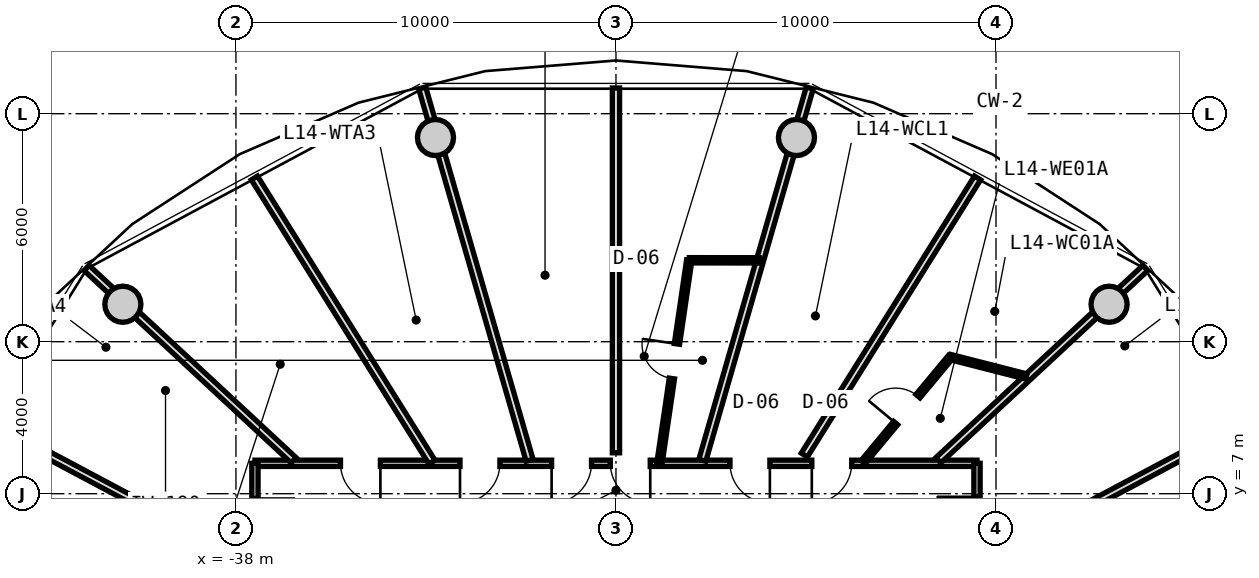
"""IFC4 building model, lengths in metres.
Left out: names, types, materials, properties, quantities, classifications, styles, units other than length and angle.
Written with IfcOpenShell. Run it as: python <this file> out.ifc"""

import sys

from ifc_helpers import new_model, si_unit, direction, frame, frame_2d, origin, origin_2d, place, context, subcontext, project, spatial, rectangle, circle, extrude, source, transform, mapped, element, fill, save


model = new_model("IFC4")
c1 = context("Model", 3, precision=1e-05, world=origin(), true_north=direction((0.0, 1.0)))
c2 = subcontext(c1, "Body", "Model", "MODEL_VIEW")
j1 = project(units=[si_unit("LENGTHUNIT", "METRE"), si_unit("PLANEANGLEUNIT", "RADIAN")], contexts=[c1])
p1 = place(None, origin())
s1 = spatial("IfcSite", under=j1, at=p1, CompositionType="ELEMENT")
p2 = place(p1, origin())
s2 = spatial("IfcBuilding", under=s1, at=p2, CompositionType="ELEMENT")
p3 = place(p2, frame((0.0, 0.0, 49.05)))
s3 = spatial("IfcBuildingStorey", under=s2, at=p3, CompositionType="ELEMENT", Elevation=49.05)
m1 = source(origin(), c2, "Body", "SweptSolid", [
    extrude(circle(Radius=0.475, at=origin_2d()), origin(), (0.0, 0.0, 1.0), 3.05),
])
for number, where, z_axis, x_axis in (
    (1, (-15.025, 11.985, 0.0), (0.0, 0.0, 1.0), (1.0, 0.0, 0.0)),
    (2, (-23.251, 16.373, 0.0), (0.0, 0.0, 1.0), (1.0, 0.0, 0.0)),
    (3, (-32.749, 16.373, 0.0), (0.0, 0.0, 1.0), (1.0, 0.0, 0.0)),
    (4, (-40.975, 11.985, 0.0), (0.0, 0.0, 1.0), (1.0, 0.0, 0.0)),
):
    element("IfcColumn", number, at=place(p3, frame(where, z_axis=z_axis, x_axis=x_axis)), inside=s3, PredefinedType="COLUMN", context=c2, shape_type="MappedRepresentation", body=[
        mapped(m1, transform((0.0, 0.0, 0.0), x_axis=(1.0, 0.0, 0.0), y_axis=(0.0, 1.0, 0.0), z_axis=(0.0, 0.0, 1.0), scale=1.0)),
    ])
m2 = source(origin(), c2, "Body", "SweptSolid", [
    extrude(rectangle(XDim=19.0, YDim=0.165, at=frame_2d((9.5, 0.0))), origin(), (0.0, 0.0, 1.0), 2.775),
])
p4 = place(p3, frame((-37.5, 7.8, 0.0), z_axis=(0.0, 0.0, 1.0), x_axis=(1.0, 0.0, 0.0)))
e5 = element("IfcWall", 5, at=p4, inside=s3, PredefinedType="PARTITIONING", context=c2, shape_type="MappedRepresentation", body=[
    mapped(m2, transform((0.0, 0.0, 0.0), x_axis=(1.0, 0.0, 0.0), y_axis=(0.0, 1.0, 0.0), z_axis=(0.0, 0.0, 1.0), scale=1.0)),
])
p5 = place(p4, frame((14.653, 0.0, 0.0)))
e6 = element("IfcOpeningElement", 6, at=p5, cuts=e5, PredefinedType="OPENING", context=c2, shape_type="SweptSolid", body=[
    extrude(rectangle(XDim=1.05, YDim=2.15, at=frame_2d((0.525, 1.075))), frame((0.0, 0.093, 0.0), z_axis=(0.0, -1.0, 0.0), x_axis=(1.0, 0.0, 0.0)), (0.0, 0.0, 1.0), 0.185),
])
p6 = place(p4, frame((12.5, 0.0, 0.0)))
e7 = element("IfcOpeningElement", 7, at=p6, cuts=e5, PredefinedType="OPENING", context=c2, shape_type="SweptSolid", body=[
    extrude(rectangle(XDim=1.05, YDim=2.15, at=frame_2d((0.525, 1.075))), frame((0.0, 0.093, 0.0), z_axis=(0.0, -1.0, 0.0), x_axis=(1.0, 0.0, 0.0)), (0.0, 0.0, 1.0), 0.185),
])
p7 = place(p4, frame((9.352, 0.0, 0.0)))
e8 = element("IfcOpeningElement", 8, at=p7, cuts=e5, PredefinedType="OPENING", context=c2, shape_type="SweptSolid", body=[
    extrude(rectangle(XDim=1.05, YDim=2.15, at=frame_2d((0.525, 1.075))), frame((0.0, 0.093, 0.0), z_axis=(0.0, -1.0, 0.0), x_axis=(1.0, 0.0, 0.0)), (0.0, 0.0, 1.0), 0.185),
])
p8 = place(p4, frame((7.806, 0.0, 0.0)))
e9 = element("IfcOpeningElement", 9, at=p8, cuts=e5, PredefinedType="OPENING", context=c2, shape_type="SweptSolid", body=[
    extrude(rectangle(XDim=1.05, YDim=2.15, at=frame_2d((0.525, 1.075))), frame((0.0, 0.093, 0.0), z_axis=(0.0, -1.0, 0.0), x_axis=(1.0, 0.0, 0.0)), (0.0, 0.0, 1.0), 0.185),
])
p9 = place(p4, frame((5.396, 0.0, 0.0)))
e10 = element("IfcOpeningElement", 10, at=p9, cuts=e5, PredefinedType="OPENING", context=c2, shape_type="SweptSolid", body=[
    extrude(rectangle(XDim=1.05, YDim=2.15, at=frame_2d((0.525, 1.075))), frame((0.0, 0.093, 0.0), z_axis=(0.0, -1.0, 0.0), x_axis=(1.0, 0.0, 0.0)), (0.0, 0.0, 1.0), 0.185),
])
p10 = place(p4, frame((2.251, 0.0, 0.0)))
e11 = element("IfcOpeningElement", 11, at=p10, cuts=e5, PredefinedType="OPENING", context=c2, shape_type="SweptSolid", body=[
    extrude(rectangle(XDim=1.05, YDim=2.15, at=frame_2d((0.525, 1.075))), frame((0.0, 0.093, 0.0), z_axis=(0.0, -1.0, 0.0), x_axis=(1.0, 0.0, 0.0)), (0.0, 0.0, 1.0), 0.185),
])
m3 = source(origin(), c2, "Body", "SweptSolid", [
    extrude(rectangle(XDim=15.6, YDim=0.165, at=frame_2d((7.8, 0.0))), origin(), (0.0, 0.0, 1.0), 2.775),
])
p11 = place(p3, frame((-37.5, -7.8, 0.0), z_axis=(0.0, 0.0, 1.0), x_axis=(0.0, 1.0, 0.0)))
e12 = element("IfcWall", 12, at=p11, inside=s3, PredefinedType="PARTITIONING", context=c2, shape_type="MappedRepresentation", body=[
    mapped(m3, transform((0.0, 0.0, 0.0), x_axis=(1.0, 0.0, 0.0), y_axis=(0.0, 1.0, 0.0), z_axis=(0.0, 0.0, 1.0), scale=1.0)),
])
p12 = place(p11, frame((13.623, 0.0, 0.0)))
e13 = element("IfcOpeningElement", 13, at=p12, cuts=e12, PredefinedType="OPENING", context=c2, shape_type="SweptSolid", body=[
    extrude(rectangle(XDim=1.05, YDim=2.15, at=frame_2d((0.525, 1.075))), frame((0.0, 0.093, 0.0), z_axis=(0.0, -1.0, 0.0), x_axis=(1.0, 0.0, 0.0)), (0.0, 0.0, 1.0), 0.185),
])
p13 = place(p11, frame((11.018, 0.0, 0.0)))
e14 = element("IfcOpeningElement", 14, at=p13, cuts=e12, PredefinedType="OPENING", context=c2, shape_type="SweptSolid", body=[
    extrude(rectangle(XDim=1.05, YDim=2.15, at=frame_2d((0.525, 1.075))), frame((0.0, 0.093, 0.0), z_axis=(0.0, -1.0, 0.0), x_axis=(1.0, 0.0, 0.0)), (0.0, 0.0, 1.0), 0.185),
])
p14 = place(p11, frame((8.467, 0.0, 0.0)))
e15 = element("IfcOpeningElement", 15, at=p14, cuts=e12, PredefinedType="OPENING", context=c2, shape_type="SweptSolid", body=[
    extrude(rectangle(XDim=1.05, YDim=2.15, at=frame_2d((0.525, 1.075))), frame((0.0, 0.093, 0.0), z_axis=(0.0, -1.0, 0.0), x_axis=(1.0, 0.0, 0.0)), (0.0, 0.0, 1.0), 0.185),
])
p15 = place(p11, frame((6.035, 0.0, 0.0)))
e16 = element("IfcOpeningElement", 16, at=p15, cuts=e12, PredefinedType="OPENING", context=c2, shape_type="SweptSolid", body=[
    extrude(rectangle(XDim=1.05, YDim=2.15, at=frame_2d((0.525, 1.075))), frame((0.0, 0.093, 0.0), z_axis=(0.0, -1.0, 0.0), x_axis=(1.0, 0.0, 0.0)), (0.0, 0.0, 1.0), 0.185),
])
p16 = place(p11, frame((3.489, 0.0, 0.0)))
e17 = element("IfcOpeningElement", 17, at=p16, cuts=e12, PredefinedType="OPENING", context=c2, shape_type="SweptSolid", body=[
    extrude(rectangle(XDim=1.05, YDim=2.15, at=frame_2d((0.525, 1.075))), frame((0.0, 0.093, 0.0), z_axis=(0.0, -1.0, 0.0), x_axis=(1.0, 0.0, 0.0)), (0.0, 0.0, 1.0), 0.185),
])
p17 = place(p11, frame((0.882, 0.0, 0.0)))
e18 = element("IfcOpeningElement", 18, at=p17, cuts=e12, PredefinedType="OPENING", context=c2, shape_type="SweptSolid", body=[
    extrude(rectangle(XDim=1.05, YDim=2.15, at=frame_2d((0.525, 1.075))), frame((0.0, 0.093, 0.0), z_axis=(0.0, -1.0, 0.0), x_axis=(1.0, 0.0, 0.0)), (0.0, 0.0, 1.0), 0.185),
])
p18 = place(p3, frame((-18.5, 7.8, 0.0), z_axis=(0.0, 0.0, 1.0), x_axis=(0.0, -1.0, 0.0)))
e19 = element("IfcWall", 19, at=p18, inside=s3, PredefinedType="PARTITIONING", context=c2, shape_type="MappedRepresentation", body=[
    mapped(m3, transform((0.0, 0.0, 0.0), x_axis=(1.0, 0.0, 0.0), y_axis=(0.0, 1.0, 0.0), z_axis=(0.0, 0.0, 1.0), scale=1.0)),
])
p19 = place(p18, frame((12.141, 0.0, 0.0)))
e20 = element("IfcOpeningElement", 20, at=p19, cuts=e19, PredefinedType="OPENING", context=c2, shape_type="SweptSolid", body=[
    extrude(rectangle(XDim=1.25, YDim=2.2, at=frame_2d((0.625, 1.1))), frame((0.0, 0.093, 0.0), z_axis=(0.0, -1.0, 0.0), x_axis=(1.0, 0.0, 0.0)), (0.0, 0.0, 1.0), 0.185),
])
p20 = place(p18, frame((7.175, 0.0, 0.0)))
e21 = element("IfcOpeningElement", 21, at=p20, cuts=e19, PredefinedType="OPENING", context=c2, shape_type="SweptSolid", body=[
    extrude(rectangle(XDim=1.25, YDim=2.2, at=frame_2d((0.625, 1.1))), frame((0.0, 0.093, 0.0), z_axis=(0.0, -1.0, 0.0), x_axis=(1.0, 0.0, 0.0)), (0.0, 0.0, 1.0), 0.185),
])
p21 = place(p18, frame((2.826, 0.0, 0.0)))
e22 = element("IfcOpeningElement", 22, at=p21, cuts=e19, PredefinedType="OPENING", context=c2, shape_type="SweptSolid", body=[
    extrude(rectangle(XDim=1.05, YDim=2.15, at=frame_2d((0.525, 1.075))), frame((0.0, 0.093, 0.0), z_axis=(0.0, -1.0, 0.0), x_axis=(1.0, 0.0, 0.0)), (0.0, 0.0, 1.0), 0.185),
])
p22 = place(p18, frame((0.881, 0.0, 0.0)))
e23 = element("IfcOpeningElement", 23, at=p22, cuts=e19, PredefinedType="OPENING", context=c2, shape_type="SweptSolid", body=[
    extrude(rectangle(XDim=1.05, YDim=2.15, at=frame_2d((0.525, 1.075))), frame((0.0, 0.093, 0.0), z_axis=(0.0, -1.0, 0.0), x_axis=(1.0, 0.0, 0.0)), (0.0, 0.0, 1.0), 0.185),
])
m4 = source(origin(), c2, "Body", "SweptSolid", [
    extrude(rectangle(XDim=7.435, YDim=0.19, at=frame_2d((3.717, 0.0))), origin(), (0.0, 0.0, 1.0), 2.225),
])
p23 = place(p3, frame((-36.483, 7.88, 0.0), z_axis=(0.0, 0.0, 1.0), x_axis=(-0.732651956848, 0.680603489652, 0.0)))
e24 = element("IfcWall", 24, at=p23, inside=s3, PredefinedType="PARTITIONING", context=c2, shape_type="MappedRepresentation", body=[
    mapped(m4, transform((0.0, 0.0, 0.0), x_axis=(1.0, 0.0, 0.0), y_axis=(0.0, 1.0, 0.0), z_axis=(0.0, 0.0, 1.0), scale=1.0)),
])
m5 = source(origin(), c2, "Body", "SweptSolid", [
    extrude(rectangle(XDim=7.873, YDim=0.19, at=frame_2d((3.937, 0.0))), origin(), (0.0, 0.0, 1.0), 2.775),
])
p24 = place(p3, frame((-37.53, 5.138, 0.0), z_axis=(0.0, 0.0, 1.0), x_axis=(-0.882666052726, 0.470000680175, 0.0)))
e25 = element("IfcWall", 25, at=p24, inside=s3, PredefinedType="PARTITIONING", context=c2, shape_type="MappedRepresentation", body=[
    mapped(m5, transform((0.0, 0.0, 0.0), x_axis=(1.0, 0.0, 0.0), y_axis=(0.0, 1.0, 0.0), z_axis=(0.0, 0.0, 1.0), scale=1.0)),
])
p25 = place(p3, frame((-19.517, 7.88, 0.0), z_axis=(0.0, 0.0, 1.0), x_axis=(0.732651956848, 0.680603489652, 0.0)))
e26 = element("IfcWall", 26, at=p25, inside=s3, PredefinedType="PARTITIONING", context=c2, shape_type="MappedRepresentation", body=[
    mapped(m4, transform((0.0, 0.0, 0.0), x_axis=(1.0, 0.0, 0.0), y_axis=(0.0, 1.0, 0.0), z_axis=(0.0, 0.0, 1.0), scale=1.0)),
])
m6 = source(origin(), c2, "Body", "SweptSolid", [
    extrude(rectangle(XDim=7.677, YDim=0.19, at=frame_2d((3.838, 0.0))), origin(), (0.0, 0.0, 1.0), 2.775),
])
p26 = place(p3, frame((-18.297, 5.231, 0.0), z_axis=(0.0, 0.0, 1.0), x_axis=(0.882725057546, 0.469889851753, 0.0)))
e27 = element("IfcWall", 27, at=p26, inside=s3, PredefinedType="PARTITIONING", context=c2, shape_type="MappedRepresentation", body=[
    mapped(m6, transform((0.0, 0.0, 0.0), x_axis=(1.0, 0.0, 0.0), y_axis=(0.0, 1.0, 0.0), z_axis=(0.0, 0.0, 1.0), scale=1.0)),
])
m7 = source(origin(), c2, "Body", "SweptSolid", [
    extrude(rectangle(XDim=10.196, YDim=0.19, at=frame_2d((5.098, 0.0))), origin(), (0.0, 0.0, 1.0), 2.225),
])
p27 = place(p3, frame((-25.727, 7.88, 0.0), z_axis=(0.0, 0.0, 1.0), x_axis=(0.277136420347, 0.960830580549, 0.0)))
e28 = element("IfcWall", 28, at=p27, inside=s3, PredefinedType="PARTITIONING", context=c2, shape_type="MappedRepresentation", body=[
    mapped(m7, transform((0.0, 0.0, 0.0), x_axis=(1.0, 0.0, 0.0), y_axis=(0.0, 1.0, 0.0), z_axis=(0.0, 0.0, 1.0), scale=1.0)),
])
m8 = source(origin(), c2, "Body", "SweptSolid", [
    extrude(rectangle(XDim=8.598, YDim=0.19, at=frame_2d((4.299, 0.0))), origin(), (0.0, 0.0, 1.0), 2.775),
])
p28 = place(p3, frame((-23.043, 8.017, 0.0), z_axis=(0.0, 0.0, 1.0), x_axis=(0.530039776395, 0.847972779893, 0.0)))
e29 = element("IfcWall", 29, at=p28, inside=s3, PredefinedType="PARTITIONING", context=c2, shape_type="MappedRepresentation", body=[
    mapped(m8, transform((0.0, 0.0, 0.0), x_axis=(1.0, 0.0, 0.0), y_axis=(0.0, 1.0, 0.0), z_axis=(0.0, 0.0, 1.0), scale=1.0)),
])
m9 = source(origin(), c2, "Body", "SweptSolid", [
    extrude(rectangle(XDim=3.594, YDim=0.14, at=frame_2d((1.797, 0.0))), origin(), (0.0, 0.0, 1.0), 2.775),
])
p29 = place(p3, frame((-21.496, 7.83, 0.0), z_axis=(0.0, 0.0, 1.0), x_axis=(0.639001147083, 0.769205781326, 0.0)))
e30 = element("IfcWall", 30, at=p29, inside=s3, PredefinedType="PARTITIONING", context=c2, shape_type="MappedRepresentation", body=[
    mapped(m9, transform((0.0, 0.0, 0.0), x_axis=(1.0, 0.0, 0.0), y_axis=(0.0, 1.0, 0.0), z_axis=(0.0, 0.0, 1.0), scale=1.0)),
])
p30 = place(p29, frame((1.337, 0.0, 0.0)))
e31 = element("IfcOpeningElement", 31, at=p30, cuts=e30, PredefinedType="OPENING", context=c2, shape_type="SweptSolid", body=[
    extrude(rectangle(XDim=0.92, YDim=2.1, at=frame_2d((0.46, 1.05))), frame((0.0, 0.08, 0.0), z_axis=(0.0, -1.0, 0.0), x_axis=(1.0, 0.0, 0.0)), (0.0, 0.0, 1.0), 0.16),
])
m10 = source(origin(), c2, "Body", "SweptSolid", [
    extrude(rectangle(XDim=2.062, YDim=0.14, at=frame_2d((1.031, 0.0))), origin(), (0.0, 0.0, 1.0), 2.415),
])
p31 = place(p3, frame((-19.199, 10.595, 0.0), z_axis=(0.0, 0.0, 1.0), x_axis=(0.968776253543, -0.247936626121, 0.0)))
e32 = element("IfcWall", 32, at=p31, inside=s3, PredefinedType="PARTITIONING", context=c2, shape_type="MappedRepresentation", body=[
    mapped(m10, transform((0.0, 0.0, 0.0), x_axis=(1.0, 0.0, 0.0), y_axis=(0.0, 1.0, 0.0), z_axis=(0.0, 0.0, 1.0), scale=1.0)),
])
p32 = place(p3, frame((-30.273, 7.88, 0.0), z_axis=(0.0, 0.0, 1.0), x_axis=(-0.277136420347, 0.960830580549, 0.0)))
e33 = element("IfcWall", 33, at=p32, inside=s3, PredefinedType="PARTITIONING", context=c2, shape_type="MappedRepresentation", body=[
    mapped(m7, transform((0.0, 0.0, 0.0), x_axis=(1.0, 0.0, 0.0), y_axis=(0.0, 1.0, 0.0), z_axis=(0.0, 0.0, 1.0), scale=1.0)),
])
m11 = source(origin(), c2, "Body", "SweptSolid", [
    extrude(rectangle(XDim=9.601, YDim=0.19, at=frame_2d((4.8, 0.0))), origin(), (0.0, 0.0, 1.0), 2.775),
])
p33 = place(p3, frame((-28.0, 8.076, 0.0), z_axis=(0.0, 0.0, 1.0), x_axis=(0.0, 1.0, 0.0)))
e34 = element("IfcWall", 34, at=p33, inside=s3, PredefinedType="PARTITIONING", context=c2, shape_type="MappedRepresentation", body=[
    mapped(m11, transform((0.0, 0.0, 0.0), x_axis=(1.0, 0.0, 0.0), y_axis=(0.0, 1.0, 0.0), z_axis=(0.0, 0.0, 1.0), scale=1.0)),
])
m12 = source(origin(), c2, "Body", "SweptSolid", [
    extrude(rectangle(XDim=5.37, YDim=0.14, at=frame_2d((2.685, 0.0))), origin(), (0.0, 0.0, 1.0), 2.775),
])
p34 = place(p3, frame((-26.851, 7.83, 0.0), z_axis=(0.0, 0.0, 1.0), x_axis=(0.145131397853, 0.989412389935, 0.0)))
e35 = element("IfcWall", 35, at=p34, inside=s3, PredefinedType="PARTITIONING", context=c2, shape_type="MappedRepresentation", body=[
    mapped(m12, transform((0.0, 0.0, 0.0), x_axis=(1.0, 0.0, 0.0), y_axis=(0.0, 1.0, 0.0), z_axis=(0.0, 0.0, 1.0), scale=1.0)),
])
p35 = place(p34, frame((2.225, 0.0, 0.0)))
e36 = element("IfcOpeningElement", 36, at=p35, cuts=e35, PredefinedType="OPENING", context=c2, shape_type="SweptSolid", body=[
    extrude(rectangle(XDim=0.92, YDim=2.1, at=frame_2d((0.46, 1.05))), frame((0.0, 0.08, 0.0), z_axis=(0.0, -1.0, 0.0), x_axis=(1.0, 0.0, 0.0)), (0.0, 0.0, 1.0), 0.16),
])
m13 = source(origin(), c2, "Body", "SweptSolid", [
    extrude(rectangle(XDim=1.843, YDim=0.14, at=frame_2d((0.921, 0.0))), origin(), (0.0, 0.0, 1.0), 2.775),
])
p36 = place(p3, frame((-26.072, 13.143, 0.0), z_axis=(0.0, 0.0, 1.0), x_axis=(0.999998937801, -0.001457531246, 0.0)))
e37 = element("IfcWall", 37, at=p36, inside=s3, PredefinedType="PARTITIONING", context=c2, shape_type="MappedRepresentation", body=[
    mapped(m13, transform((0.0, 0.0, 0.0), x_axis=(1.0, 0.0, 0.0), y_axis=(0.0, 1.0, 0.0), z_axis=(0.0, 0.0, 1.0), scale=1.0)),
])
m14 = source(origin(), c2, "Body", "SweptSolid", [
    extrude(rectangle(XDim=8.818, YDim=0.19, at=frame_2d((4.409, 0.0))), origin(), (0.0, 0.0, 1.0), 2.775),
])
p37 = place(p3, frame((-32.841, 7.83, 0.0), z_axis=(0.0, 0.0, 1.0), x_axis=(-0.529931746109, 0.848040296487, 0.0)))
e38 = element("IfcWall", 38, at=p37, inside=s3, PredefinedType="PARTITIONING", context=c2, shape_type="MappedRepresentation", body=[
    mapped(m14, transform((0.0, 0.0, 0.0), x_axis=(1.0, 0.0, 0.0), y_axis=(0.0, 1.0, 0.0), z_axis=(0.0, 0.0, 1.0), scale=1.0)),
])
m15 = source(origin(), c2, "Body", "SweptSolid", [
    extrude(rectangle(XDim=1.05, YDim=2.15, at=frame_2d((0.525, 1.075))), frame((0.0, 0.025, 0.0), z_axis=(0.0, -1.0, 0.0), x_axis=(1.0, 0.0, 0.0)), (0.0, 0.0, 1.0), 0.05),
])
p38 = place(p22, frame((1.05, 0.0, 0.0), z_axis=(0.0, 0.0, 1.0), x_axis=(-1.0, 0.0, 0.0)))
e39 = element("IfcDoor", 39, at=p38, inside=s3, OperationType="SINGLE_SWING_RIGHT", PredefinedType="DOOR", context=c2, shape_type="MappedRepresentation", body=[
    mapped(m15, transform((0.0, 0.0, 0.0), x_axis=(1.0, 0.0, 0.0), y_axis=(0.0, 1.0, 0.0), z_axis=(0.0, 0.0, 1.0), scale=1.0)),
])
fill(e23, e39)
p39 = place(p5, frame((1.05, 0.0, 0.0), z_axis=(0.0, 0.0, 1.0), x_axis=(-1.0, 0.0, 0.0)))
e40 = element("IfcDoor", 40, at=p39, inside=s3, OperationType="SINGLE_SWING_RIGHT", PredefinedType="DOOR", context=c2, shape_type="MappedRepresentation", body=[
    mapped(m15, transform((0.0, 0.0, 0.0), x_axis=(1.0, 0.0, 0.0), y_axis=(0.0, 1.0, 0.0), z_axis=(0.0, 0.0, 1.0), scale=1.0)),
])
fill(e6, e40)
m16 = source(origin(), c2, "Body", "SweptSolid", [
    extrude(rectangle(XDim=0.92, YDim=2.1, at=frame_2d((0.46, 1.05))), frame((0.0, 0.025, 0.0), z_axis=(0.0, -1.0, 0.0), x_axis=(1.0, 0.0, 0.0)), (0.0, 0.0, 1.0), 0.05),
])
p40 = place(p30, origin())
e41 = element("IfcDoor", 41, at=p40, inside=s3, OperationType="SINGLE_SWING_LEFT", PredefinedType="DOOR", context=c2, shape_type="MappedRepresentation", body=[
    mapped(m16, transform((0.0, 0.0, 0.0), x_axis=(1.0, 0.0, 0.0), y_axis=(0.0, 1.0, 0.0), z_axis=(0.0, 0.0, 1.0), scale=1.0)),
])
fill(e31, e41)
p41 = place(p6, frame((1.05, 0.0, 0.0), z_axis=(0.0, 0.0, 1.0), x_axis=(-1.0, 0.0, 0.0)))
e42 = element("IfcDoor", 42, at=p41, inside=s3, OperationType="SINGLE_SWING_LEFT", PredefinedType="DOOR", context=c2, shape_type="MappedRepresentation", body=[
    mapped(m15, transform((0.0, 0.0, 0.0), x_axis=(1.0, 0.0, 0.0), y_axis=(0.0, 1.0, 0.0), z_axis=(0.0, 0.0, 1.0), scale=1.0)),
])
fill(e7, e42)
p42 = place(p7, frame((1.05, 0.0, 0.0), z_axis=(0.0, 0.0, 1.0), x_axis=(-1.0, 0.0, 0.0)))
e43 = element("IfcDoor", 43, at=p42, inside=s3, OperationType="SINGLE_SWING_LEFT", PredefinedType="DOOR", context=c2, shape_type="MappedRepresentation", body=[
    mapped(m15, transform((0.0, 0.0, 0.0), x_axis=(1.0, 0.0, 0.0), y_axis=(0.0, 1.0, 0.0), z_axis=(0.0, 0.0, 1.0), scale=1.0)),
])
fill(e8, e43)
p43 = place(p35, origin())
e44 = element("IfcDoor", 44, at=p43, inside=s3, OperationType="SINGLE_SWING_RIGHT", PredefinedType="DOOR", context=c2, shape_type="MappedRepresentation", body=[
    mapped(m16, transform((0.0, 0.0, 0.0), x_axis=(1.0, 0.0, 0.0), y_axis=(0.0, 1.0, 0.0), z_axis=(0.0, 0.0, 1.0), scale=1.0)),
])
fill(e36, e44)
p44 = place(p8, frame((1.05, 0.0, 0.0), z_axis=(0.0, 0.0, 1.0), x_axis=(-1.0, 0.0, 0.0)))
e45 = element("IfcDoor", 45, at=p44, inside=s3, OperationType="SINGLE_SWING_RIGHT", PredefinedType="DOOR", context=c2, shape_type="MappedRepresentation", body=[
    mapped(m15, transform((0.0, 0.0, 0.0), x_axis=(1.0, 0.0, 0.0), y_axis=(0.0, 1.0, 0.0), z_axis=(0.0, 0.0, 1.0), scale=1.0)),
])
fill(e9, e45)
p45 = place(p9, frame((1.05, 0.0, 0.0), z_axis=(0.0, 0.0, 1.0), x_axis=(-1.0, 0.0, 0.0)))
e46 = element("IfcDoor", 46, at=p45, inside=s3, OperationType="SINGLE_SWING_RIGHT", PredefinedType="DOOR", context=c2, shape_type="MappedRepresentation", body=[
    mapped(m15, transform((0.0, 0.0, 0.0), x_axis=(1.0, 0.0, 0.0), y_axis=(0.0, 1.0, 0.0), z_axis=(0.0, 0.0, 1.0), scale=1.0)),
])
fill(e10, e46)
p46 = place(p10, frame((1.05, 0.0, 0.0), z_axis=(0.0, 0.0, 1.0), x_axis=(-1.0, 0.0, 0.0)))
e47 = element("IfcDoor", 47, at=p46, inside=s3, OperationType="SINGLE_SWING_LEFT", PredefinedType="DOOR", context=c2, shape_type="MappedRepresentation", body=[
    mapped(m15, transform((0.0, 0.0, 0.0), x_axis=(1.0, 0.0, 0.0), y_axis=(0.0, 1.0, 0.0), z_axis=(0.0, 0.0, 1.0), scale=1.0)),
])
fill(e11, e47)
save(model, sys.argv[1])
